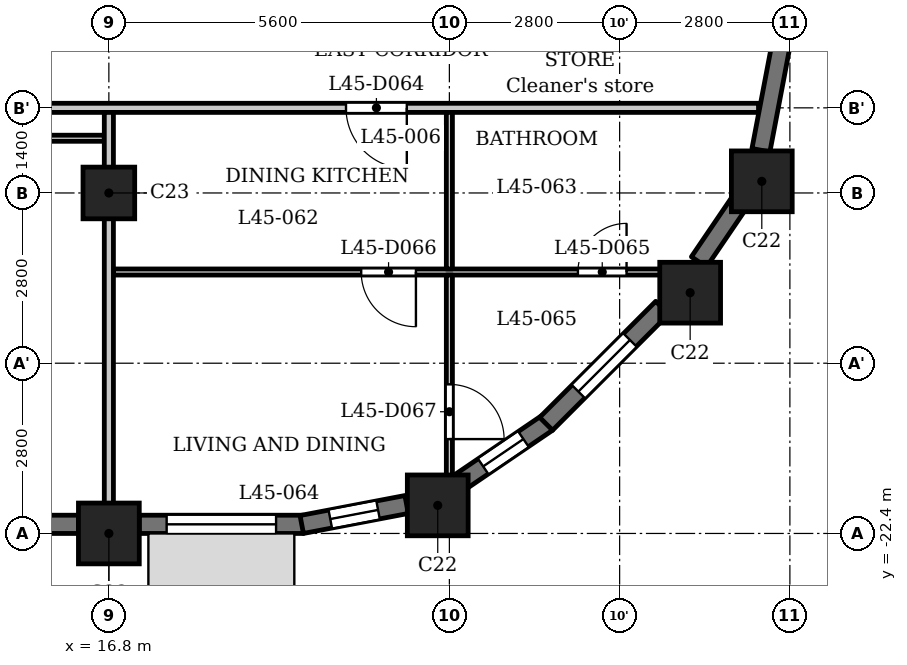
"""IFC4 building model, lengths in metres.
Left out: names, types, materials, properties, quantities, classifications, styles, units other than length and angle.
Written with IfcOpenShell. Run it as: python <this file> out.ifc"""

import sys

from ifc_helpers import new_model, si_unit, direction, frame, frame_2d, origin, origin_2d, place, context, subcontext, project, spatial, rectangle, extrude, element, fill, save


model = new_model("IFC4")
c1 = context("Model", 3, precision=1e-05, world=origin(), true_north=direction((0.0, 1.0)))
c2 = subcontext(c1, "Body", "Model", "MODEL_VIEW")
j1 = project(units=[si_unit("LENGTHUNIT", "METRE"), si_unit("PLANEANGLEUNIT", "RADIAN")], contexts=[c1])
p1 = place(None, origin())
s1 = spatial("IfcSite", under=j1, at=p1, CompositionType="ELEMENT")
p2 = place(p1, origin())
s2 = spatial("IfcBuilding", under=s1, at=p2, CompositionType="ELEMENT")
p3 = place(p2, frame((0.0, 0.0, 174.6)))
s3 = spatial("IfcBuildingStorey", under=s2, at=p3, CompositionType="ELEMENT", Elevation=174.6)
for number, where, z_axis, x_axis in (
    (1, (16.8, -22.4, 0.0), (0.0, 0.0, 1.0), (1.0, 0.0, 0.0)),
    (2, (22.209, -21.938, 0.0), (0.0, 0.0, 1.0), (1.0, 0.0, 0.0)),
    (3, (26.36, -18.44, 0.0), (0.0, 0.0, 1.0), (1.0, 0.0, 0.0)),
    (4, (27.538, -16.609, 0.0), (0.0, 0.0, 1.0), (1.0, 0.0, 0.0)),
):
    element("IfcColumn", number, at=place(p3, frame(where, z_axis=z_axis, x_axis=x_axis)), inside=s3, PredefinedType="COLUMN", context=c2, shape_type="SweptSolid", body=[
        extrude(rectangle(XDim=1.0, YDim=1.0, at=origin_2d()), origin(), (0.0, 0.0, 1.0), 3.5),
    ])
p4 = place(p3, frame((16.8, -16.8, 0.0), z_axis=(0.0, 0.0, 1.0), x_axis=(1.0, 0.0, 0.0)))
e5 = element("IfcColumn", 5, at=p4, inside=s3, PredefinedType="COLUMN", context=c2, shape_type="SweptSolid", body=[
    extrude(rectangle(XDim=0.85, YDim=0.85, at=origin_2d()), origin(), (0.0, 0.0, 1.0), 3.5),
])
p5 = place(p3, frame((11.7, -22.25, 0.0), z_axis=(0.0, 0.0, 1.0), x_axis=(1.0, 0.0, 0.0)))
e6 = element("IfcWall", 6, at=p5, inside=s3, PredefinedType="SOLIDWALL", context=c2, shape_type="SweptSolid", body=[
    extrude(rectangle(XDim=4.6, YDim=0.3, at=frame_2d((2.3, 0.0))), origin(), (0.0, 0.0, 1.0), 2.4),
])
p6 = place(p5, frame((0.5, 0.0, 1.2)))
e7 = element("IfcOpeningElement", 7, at=p6, cuts=e6, PredefinedType="OPENING", context=c2, shape_type="SweptSolid", body=[
    extrude(rectangle(XDim=3.6, YDim=0.95, at=frame_2d((1.8, 0.475))), frame((0.0, 0.16, 0.0), z_axis=(0.0, -1.0, 0.0), x_axis=(1.0, 0.0, 0.0)), (0.0, 0.0, 1.0), 0.32),
])
p7 = place(p3, frame((17.3, -22.25, 0.0), z_axis=(0.0, 0.0, 1.0), x_axis=(1.0, 0.0, 0.0)))
e8 = element("IfcWall", 8, at=p7, inside=s3, PredefinedType="SOLIDWALL", context=c2, shape_type="SweptSolid", body=[
    extrude(rectangle(XDim=2.7, YDim=0.3, at=frame_2d((1.35, 0.0))), origin(), (0.0, 0.0, 1.0), 2.4),
])
p8 = place(p7, frame((0.45, 0.0, 0.9)))
e9 = element("IfcOpeningElement", 9, at=p8, cuts=e8, PredefinedType="OPENING", context=c2, shape_type="SweptSolid", body=[
    extrude(rectangle(XDim=1.8, YDim=1.25, at=frame_2d((0.9, 0.625))), frame((0.0, 0.16, 0.0), z_axis=(0.0, -1.0, 0.0), x_axis=(1.0, 0.0, 0.0)), (0.0, 0.0, 1.0), 0.32),
])
p9 = place(p3, frame((19.972, -22.253, 0.0), z_axis=(0.0, 0.0, 1.0), x_axis=(0.982284988433, 0.187393173565, 0.0)))
e10 = element("IfcWall", 10, at=p9, inside=s3, PredefinedType="SOLIDWALL", context=c2, shape_type="SweptSolid", body=[
    extrude(rectangle(XDim=1.756, YDim=0.3, at=frame_2d((0.878, 0.0))), origin(), (0.0, 0.0, 1.0), 2.4),
])
p10 = place(p9, frame((0.478, 0.0, 0.6)))
e11 = element("IfcOpeningElement", 11, at=p10, cuts=e10, PredefinedType="OPENING", context=c2, shape_type="SweptSolid", body=[
    extrude(rectangle(XDim=0.8, YDim=1.55, at=frame_2d((0.4, 0.775))), frame((0.0, 0.16, 0.0), z_axis=(0.0, -1.0, 0.0), x_axis=(1.0, 0.0, 0.0)), (0.0, 0.0, 1.0), 0.32),
])
p11 = place(p3, frame((22.56, -21.566, 0.0), z_axis=(0.0, 0.0, 1.0), x_axis=(0.82707645233, 0.562089443061, 0.0)))
e12 = element("IfcWall", 12, at=p11, inside=s3, PredefinedType="SOLIDWALL", context=c2, shape_type="SweptSolid", body=[
    extrude(rectangle(XDim=1.756, YDim=0.3, at=frame_2d((0.878, 0.0))), origin(), (0.0, 0.0, 1.0), 2.4),
])
p12 = place(p11, frame((0.478, 0.0, 0.6)))
e13 = element("IfcOpeningElement", 13, at=p12, cuts=e12, PredefinedType="OPENING", context=c2, shape_type="SweptSolid", body=[
    extrude(rectangle(XDim=0.8, YDim=1.55, at=frame_2d((0.4, 0.775))), frame((0.0, 0.16, 0.0), z_axis=(0.0, -1.0, 0.0), x_axis=(1.0, 0.0, 0.0)), (0.0, 0.0, 1.0), 0.32),
])
p13 = place(p3, frame((23.991, -20.597, 0.0), z_axis=(0.0, 0.0, 1.0), x_axis=(0.707106781187, 0.707106781187, 0.0)))
e14 = element("IfcWall", 14, at=p13, inside=s3, PredefinedType="SOLIDWALL", context=c2, shape_type="SweptSolid", body=[
    extrude(rectangle(XDim=2.7, YDim=0.3, at=frame_2d((1.35, 0.0))), origin(), (0.0, 0.0, 1.0), 2.4),
])
p14 = place(p13, frame((0.75, 0.0, 0.6)))
e15 = element("IfcOpeningElement", 15, at=p14, cuts=e14, PredefinedType="OPENING", context=c2, shape_type="SweptSolid", body=[
    extrude(rectangle(XDim=1.2, YDim=1.55, at=frame_2d((0.6, 0.775))), frame((0.0, 0.16, 0.0), z_axis=(0.0, -1.0, 0.0), x_axis=(1.0, 0.0, 0.0)), (0.0, 0.0, 1.0), 0.32),
])
p15 = place(p3, frame((26.504, -17.934, 0.0), z_axis=(0.0, 0.0, 1.0), x_axis=(0.562145470373, 0.827038372833, 0.0)))
e16 = element("IfcWall", 16, at=p15, inside=s3, PredefinedType="SOLIDWALL", context=c2, shape_type="SweptSolid", body=[
    extrude(rectangle(XDim=1.177, YDim=0.3, at=frame_2d((0.588, 0.0))), origin(), (0.0, 0.0, 1.0), 3.15),
])
p16 = place(p3, frame((27.524, -16.097, 0.0), z_axis=(0.0, 0.0, 1.0), x_axis=(0.187259034321, 0.982310569049, 0.0)))
e17 = element("IfcWall", 17, at=p16, inside=s3, PredefinedType="SOLIDWALL", context=c2, shape_type="SweptSolid", body=[
    extrude(rectangle(XDim=1.756, YDim=0.3, at=frame_2d((0.878, 0.0))), origin(), (0.0, 0.0, 1.0), 2.4),
])
p17 = place(p3, frame((16.875, -18.1, 0.0), z_axis=(0.0, 0.0, 1.0), x_axis=(1.0, 0.0, 0.0)))
e18 = element("IfcWall", 18, at=p17, inside=s3, PredefinedType="PARTITIONING", context=c2, shape_type="SweptSolid", body=[
    extrude(rectangle(XDim=9.565, YDim=0.1, at=frame_2d((4.782, 0.0))), origin(), (0.0, 0.0, 1.0), 3.15),
])
p18 = place(p17, frame((7.639, 0.0, 0.0)))
e19 = element("IfcOpeningElement", 19, at=p18, cuts=e18, PredefinedType="OPENING", context=c2, shape_type="SweptSolid", body=[
    extrude(rectangle(XDim=0.8, YDim=2.1, at=frame_2d((0.4, 1.05))), frame((0.0, 0.06, 0.0), z_axis=(0.0, -1.0, 0.0), x_axis=(1.0, 0.0, 0.0)), (0.0, 0.0, 1.0), 0.12),
])
p19 = place(p17, frame((4.075, 0.0, 0.0)))
e20 = element("IfcOpeningElement", 20, at=p19, cuts=e18, PredefinedType="OPENING", context=c2, shape_type="SweptSolid", body=[
    extrude(rectangle(XDim=0.9, YDim=2.1, at=frame_2d((0.45, 1.05))), frame((0.0, 0.06, 0.0), z_axis=(0.0, -1.0, 0.0), x_axis=(1.0, 0.0, 0.0)), (0.0, 0.0, 1.0), 0.12),
])
p20 = place(p3, frame((-16.725, -15.9, 0.0), z_axis=(0.0, 0.0, 1.0), x_axis=(1.0, 0.0, 0.0)))
e21 = element("IfcWall", 21, at=p20, inside=s3, PredefinedType="PARTITIONING", context=c2, shape_type="SweptSolid", body=[
    extrude(rectangle(XDim=33.45, YDim=0.1, at=frame_2d((16.725, 0.0))), origin(), (0.0, 0.0, 1.0), 3.15),
])
p21 = place(p20, frame((9.675, 0.0, 0.0)))
e22 = element("IfcOpeningElement", 22, at=p21, cuts=e21, PredefinedType="OPENING", context=c2, shape_type="SweptSolid", body=[
    extrude(rectangle(XDim=0.8, YDim=2.1, at=frame_2d((0.4, 1.05))), frame((0.0, 0.06, 0.0), z_axis=(0.0, -1.0, 0.0), x_axis=(1.0, 0.0, 0.0)), (0.0, 0.0, 1.0), 0.12),
])
p22 = place(p20, frame((4.075, 0.0, 0.0)))
e23 = element("IfcOpeningElement", 23, at=p22, cuts=e21, PredefinedType="OPENING", context=c2, shape_type="SweptSolid", body=[
    extrude(rectangle(XDim=0.9, YDim=2.1, at=frame_2d((0.45, 1.05))), frame((0.0, 0.06, 0.0), z_axis=(0.0, -1.0, 0.0), x_axis=(1.0, 0.0, 0.0)), (0.0, 0.0, 1.0), 0.12),
])
p23 = place(p20, frame((20.875, 0.0, 0.0)))
e24 = element("IfcOpeningElement", 24, at=p23, cuts=e21, PredefinedType="OPENING", context=c2, shape_type="SweptSolid", body=[
    extrude(rectangle(XDim=0.8, YDim=2.1, at=frame_2d((0.4, 1.05))), frame((0.0, 0.06, 0.0), z_axis=(0.0, -1.0, 0.0), x_axis=(1.0, 0.0, 0.0)), (0.0, 0.0, 1.0), 0.12),
])
p24 = place(p20, frame((15.275, 0.0, 0.0)))
e25 = element("IfcOpeningElement", 25, at=p24, cuts=e21, PredefinedType="OPENING", context=c2, shape_type="SweptSolid", body=[
    extrude(rectangle(XDim=0.9, YDim=2.1, at=frame_2d((0.45, 1.05))), frame((0.0, 0.06, 0.0), z_axis=(0.0, -1.0, 0.0), x_axis=(1.0, 0.0, 0.0)), (0.0, 0.0, 1.0), 0.12),
])
p25 = place(p20, frame((30.825, 0.0, 0.0)))
e26 = element("IfcOpeningElement", 26, at=p25, cuts=e21, PredefinedType="OPENING", context=c2, shape_type="SweptSolid", body=[
    extrude(rectangle(XDim=0.8, YDim=2.1, at=frame_2d((0.4, 1.05))), frame((0.0, 0.06, 0.0), z_axis=(0.0, -1.0, 0.0), x_axis=(1.0, 0.0, 0.0)), (0.0, 0.0, 1.0), 0.12),
])
p26 = place(p20, frame((26.475, 0.0, 0.0)))
e27 = element("IfcOpeningElement", 27, at=p26, cuts=e21, PredefinedType="OPENING", context=c2, shape_type="SweptSolid", body=[
    extrude(rectangle(XDim=0.9, YDim=2.1, at=frame_2d((0.45, 1.05))), frame((0.0, 0.06, 0.0), z_axis=(0.0, -1.0, 0.0), x_axis=(1.0, 0.0, 0.0)), (0.0, 0.0, 1.0), 0.12),
])
p27 = place(p3, frame((14.925, -15.4, 0.0), z_axis=(0.0, 0.0, 1.0), x_axis=(1.0, 0.0, 0.0)))
e28 = element("IfcWall", 28, at=p27, inside=s3, PredefinedType="PARTITIONING", context=c2, shape_type="SweptSolid", body=[
    extrude(rectangle(XDim=12.559, YDim=0.15, at=frame_2d((6.279, 0.0))), origin(), (0.0, 0.0, 1.0), 3.15),
])
p28 = place(p27, frame((5.775, 0.0, 0.0)))
e29 = element("IfcOpeningElement", 29, at=p28, cuts=e28, PredefinedType="OPENING", context=c2, shape_type="SweptSolid", body=[
    extrude(rectangle(XDim=1.0, YDim=2.1, at=frame_2d((0.5, 1.05))), frame((0.0, 0.085, 0.0), z_axis=(0.0, -1.0, 0.0), x_axis=(1.0, 0.0, 0.0)), (0.0, 0.0, 1.0), 0.17),
])
p29 = place(p3, frame((16.8, -22.88, 0.0), z_axis=(0.0, 0.0, 1.0), x_axis=(0.0, 1.0, 0.0)))
e30 = element("IfcWall", 30, at=p29, inside=s3, PredefinedType="PARTITIONING", context=c2, shape_type="SweptSolid", body=[
    extrude(rectangle(XDim=7.405, YDim=0.15, at=frame_2d((3.702, 0.0))), origin(), (0.0, 0.0, 1.0), 3.15),
])
p30 = place(p3, frame((22.4, -21.72, 0.0), z_axis=(0.0, 0.0, 1.0), x_axis=(0.0, 1.0, 0.0)))
e31 = element("IfcWall", 31, at=p30, inside=s3, PredefinedType="PARTITIONING", context=c2, shape_type="SweptSolid", body=[
    extrude(rectangle(XDim=3.57, YDim=0.1, at=frame_2d((1.785, 0.0))), origin(), (0.0, 0.0, 1.0), 3.15),
])
p31 = place(p30, frame((0.872, 0.0, 0.0)))
e32 = element("IfcOpeningElement", 32, at=p31, cuts=e31, PredefinedType="OPENING", context=c2, shape_type="SweptSolid", body=[
    extrude(rectangle(XDim=0.9, YDim=2.1, at=frame_2d((0.45, 1.05))), frame((0.0, 0.06, 0.0), z_axis=(0.0, -1.0, 0.0), x_axis=(1.0, 0.0, 0.0)), (0.0, 0.0, 1.0), 0.12),
])
p32 = place(p3, frame((22.4, -18.05, 0.0), z_axis=(0.0, 0.0, 1.0), x_axis=(0.0, 1.0, 0.0)))
e33 = element("IfcWall", 33, at=p32, inside=s3, PredefinedType="PARTITIONING", context=c2, shape_type="SweptSolid", body=[
    extrude(rectangle(XDim=2.575, YDim=0.1, at=frame_2d((1.288, 0.0))), origin(), (0.0, 0.0, 1.0), 3.15),
])
p33 = place(p28, origin())
e34 = element("IfcDoor", 34, at=p33, inside=s3, OperationType="SINGLE_SWING_RIGHT", PredefinedType="DOOR", context=c2, shape_type="SweptSolid", body=[
    extrude(rectangle(XDim=1.0, YDim=2.1, at=frame_2d((0.5, 1.05))), frame((0.0, 0.025, 0.0), z_axis=(0.0, -1.0, 0.0), x_axis=(1.0, 0.0, 0.0)), (0.0, 0.0, 1.0), 0.05),
])
fill(e29, e34)
p34 = place(p18, origin())
e35 = element("IfcDoor", 35, at=p34, inside=s3, OperationType="SINGLE_SWING_LEFT", PredefinedType="DOOR", context=c2, shape_type="SweptSolid", body=[
    extrude(rectangle(XDim=0.8, YDim=2.1, at=frame_2d((0.4, 1.05))), frame((0.0, 0.025, 0.0), z_axis=(0.0, -1.0, 0.0), x_axis=(1.0, 0.0, 0.0)), (0.0, 0.0, 1.0), 0.05),
])
fill(e19, e35)
p35 = place(p19, origin())
e36 = element("IfcDoor", 36, at=p35, inside=s3, OperationType="SINGLE_SWING_RIGHT", PredefinedType="DOOR", context=c2, shape_type="SweptSolid", body=[
    extrude(rectangle(XDim=0.9, YDim=2.1, at=frame_2d((0.45, 1.05))), frame((0.0, 0.025, 0.0), z_axis=(0.0, -1.0, 0.0), x_axis=(1.0, 0.0, 0.0)), (0.0, 0.0, 1.0), 0.05),
])
fill(e20, e36)
p36 = place(p31, origin())
e37 = element("IfcDoor", 37, at=p36, inside=s3, OperationType="SINGLE_SWING_LEFT", PredefinedType="DOOR", context=c2, shape_type="SweptSolid", body=[
    extrude(rectangle(XDim=0.9, YDim=2.1, at=frame_2d((0.45, 1.05))), frame((0.0, 0.025, 0.0), z_axis=(0.0, -1.0, 0.0), x_axis=(1.0, 0.0, 0.0)), (0.0, 0.0, 1.0), 0.05),
])
fill(e32, e37)
p37 = place(p8, origin())
e38 = element("IfcWindow", 38, at=p37, inside=s3, PartitioningType="SINGLE_PANEL", PredefinedType="WINDOW", context=c2, shape_type="SweptSolid", body=[
    extrude(rectangle(XDim=1.8, YDim=1.25, at=frame_2d((0.9, 0.625))), frame((0.0, 0.03, 0.0), z_axis=(0.0, -1.0, 0.0), x_axis=(1.0, 0.0, 0.0)), (0.0, 0.0, 1.0), 0.06),
])
fill(e9, e38)
p38 = place(p10, origin())
e39 = element("IfcWindow", 39, at=p38, inside=s3, PartitioningType="SINGLE_PANEL", PredefinedType="WINDOW", context=c2, shape_type="SweptSolid", body=[
    extrude(rectangle(XDim=0.8, YDim=1.55, at=frame_2d((0.4, 0.775))), frame((0.0, 0.03, 0.0), z_axis=(0.0, -1.0, 0.0), x_axis=(1.0, 0.0, 0.0)), (0.0, 0.0, 1.0), 0.06),
])
fill(e11, e39)
p39 = place(p12, origin())
e40 = element("IfcWindow", 40, at=p39, inside=s3, PartitioningType="SINGLE_PANEL", PredefinedType="WINDOW", context=c2, shape_type="SweptSolid", body=[
    extrude(rectangle(XDim=0.8, YDim=1.55, at=frame_2d((0.4, 0.775))), frame((0.0, 0.03, 0.0), z_axis=(0.0, -1.0, 0.0), x_axis=(1.0, 0.0, 0.0)), (0.0, 0.0, 1.0), 0.06),
])
fill(e13, e40)
p40 = place(p14, origin())
e41 = element("IfcWindow", 41, at=p40, inside=s3, PartitioningType="SINGLE_PANEL", PredefinedType="WINDOW", context=c2, shape_type="SweptSolid", body=[
    extrude(rectangle(XDim=1.2, YDim=1.55, at=frame_2d((0.6, 0.775))), frame((0.0, 0.03, 0.0), z_axis=(0.0, -1.0, 0.0), x_axis=(1.0, 0.0, 0.0)), (0.0, 0.0, 1.0), 0.06),
])
fill(e15, e41)
save(model, sys.argv[1])
